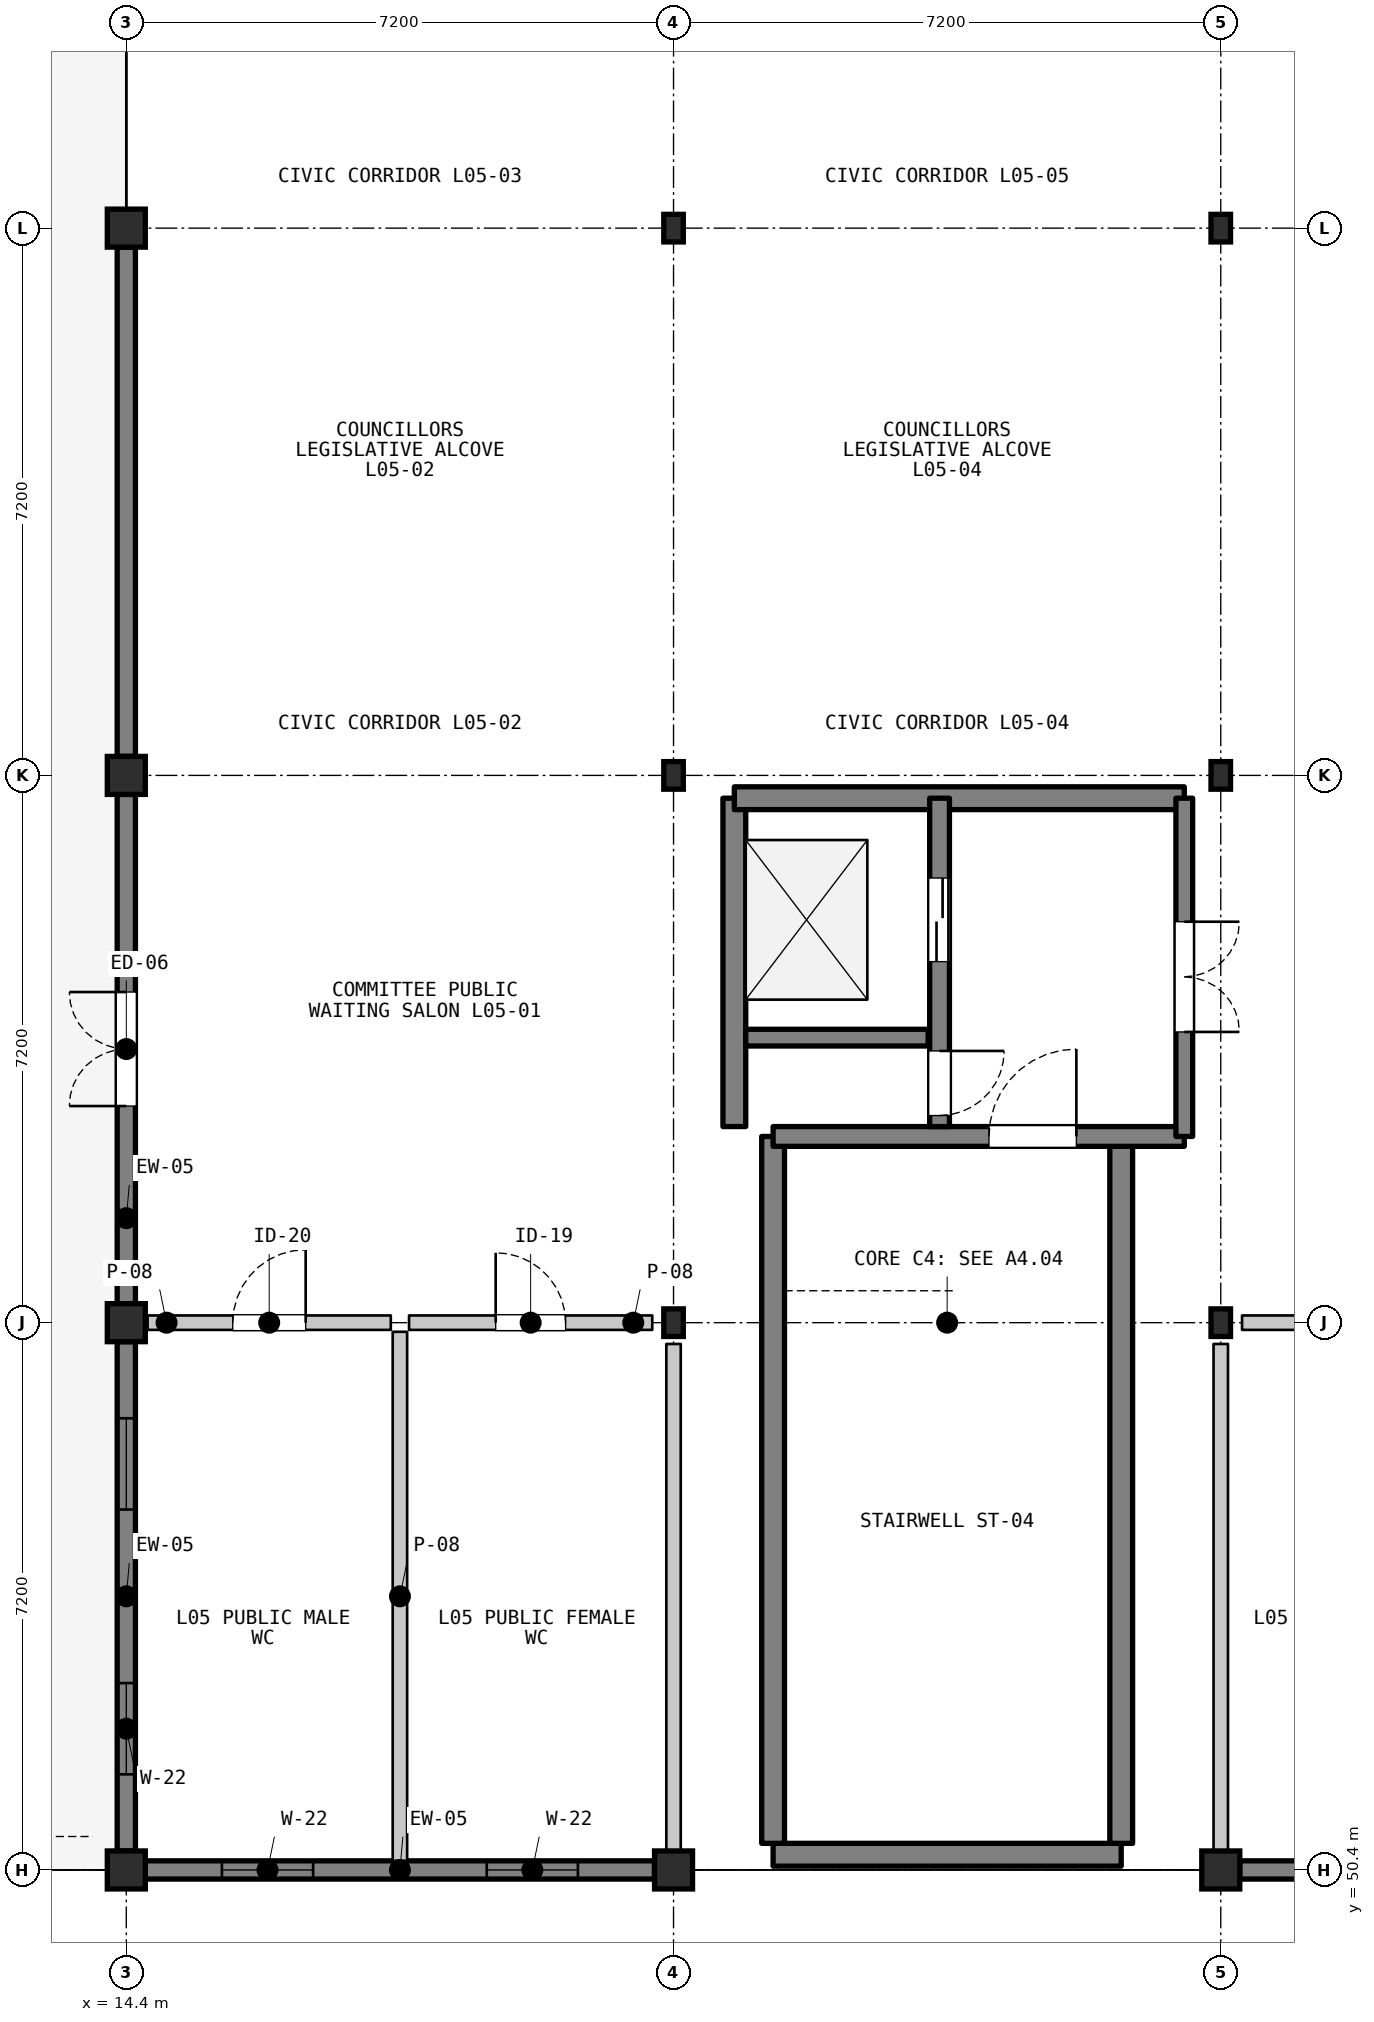
"""IFC4 building model, lengths in metres.
Left out: names, types, materials, properties, quantities, classifications, styles, units other than length and angle.
Written with IfcOpenShell. Run it as: python <this file> out.ifc"""

import sys

from ifc_helpers import new_model, si_unit, direction, frame, frame_2d, origin, origin_2d, place, context, subcontext, project, spatial, rectangle, i_section, extrude, element, fill, save


model = new_model("IFC4")
c1 = context("Model", 3, precision=1e-05, world=origin(), true_north=direction((0.0, 1.0)))
c2 = subcontext(c1, "Body", "Model", "MODEL_VIEW")
j1 = project(units=[si_unit("LENGTHUNIT", "METRE"), si_unit("PLANEANGLEUNIT", "RADIAN")], contexts=[c1])
p1 = place(None, origin())
s1 = spatial("IfcSite", under=j1, at=p1, CompositionType="ELEMENT")
p2 = place(p1, origin())
s2 = spatial("IfcBuilding", under=s1, at=p2, CompositionType="ELEMENT")
p3 = place(p2, frame((0.0, 0.0, 18.0)))
s3 = spatial("IfcBuildingStorey", under=s2, at=p3, CompositionType="ELEMENT", Elevation=18.0)
for number, where, z_axis, x_axis in (
    (1, (14.4, 50.4, 0.0), (0.0, 0.0, 1.0), (1.0, 0.0, 0.0)),
    (2, (14.4, 57.6, 0.0), (0.0, 0.0, 1.0), (1.0, 0.0, 0.0)),
    (3, (14.4, 64.8, 0.0), (0.0, 0.0, 1.0), (1.0, 0.0, 0.0)),
    (4, (14.4, 72.0, 0.0), (0.0, 0.0, 1.0), (1.0, 0.0, 0.0)),
    (5, (21.6, 50.4, 0.0), (0.0, 0.0, 1.0), (1.0, 0.0, 0.0)),
):
    element("IfcColumn", number, at=place(p3, frame(where, z_axis=z_axis, x_axis=x_axis)), inside=s3, PredefinedType="COLUMN", context=c2, shape_type="SweptSolid", body=[
        extrude(rectangle(XDim=0.5, YDim=0.5, at=origin_2d()), origin(), (0.0, 0.0, 1.0), 3.9),
    ])
for number, where, z_axis, x_axis in (
    (6, (21.6, 57.6, 0.0), (0.0, 0.0, 1.0), (1.0, 0.0, 0.0)),
    (7, (21.6, 64.8, 0.0), (0.0, 0.0, 1.0), (1.0, 0.0, 0.0)),
    (8, (21.6, 72.0, 0.0), (0.0, 0.0, 1.0), (1.0, 0.0, 0.0)),
):
    element("IfcColumn", number, at=place(p3, frame(where, z_axis=z_axis, x_axis=x_axis)), inside=s3, PredefinedType="COLUMN", context=c2, shape_type="SweptSolid", body=[
        extrude(i_section(OverallWidth=0.257, OverallDepth=0.363, WebThickness=0.013, FlangeThickness=0.022, FilletRadius=0.015, at=origin_2d()), origin(), (0.0, 0.0, 1.0), 3.9),
    ])
p4 = place(p3, frame((28.8, 50.4, 0.0), z_axis=(0.0, 0.0, 1.0), x_axis=(1.0, 0.0, 0.0)))
e9 = element("IfcColumn", 9, at=p4, inside=s3, PredefinedType="COLUMN", context=c2, shape_type="SweptSolid", body=[
    extrude(rectangle(XDim=0.5, YDim=0.5, at=origin_2d()), origin(), (0.0, 0.0, 1.0), 3.9),
])
for number, where, z_axis, x_axis in (
    (10, (28.8, 57.6, 0.0), (0.0, 0.0, 1.0), (1.0, 0.0, 0.0)),
    (11, (28.8, 64.8, 0.0), (0.0, 0.0, 1.0), (1.0, 0.0, 0.0)),
    (12, (28.8, 72.0, 0.0), (0.0, 0.0, 1.0), (1.0, 0.0, 0.0)),
):
    element("IfcColumn", number, at=place(p3, frame(where, z_axis=z_axis, x_axis=x_axis)), inside=s3, PredefinedType="COLUMN", context=c2, shape_type="SweptSolid", body=[
        extrude(i_section(OverallWidth=0.257, OverallDepth=0.363, WebThickness=0.013, FlangeThickness=0.022, FilletRadius=0.015, at=origin_2d()), origin(), (0.0, 0.0, 1.0), 3.9),
    ])
p5 = place(p3, frame((21.35, 50.4, 0.0), z_axis=(0.0, 0.0, 1.0), x_axis=(-1.0, 0.0, 0.0)))
e13 = element("IfcWall", 13, at=p5, inside=s3, PredefinedType="SOLIDWALL", context=c2, shape_type="SweptSolid", body=[
    extrude(rectangle(XDim=6.7, YDim=0.24, at=frame_2d((3.35, 0.0))), origin(), (0.0, 0.0, 1.0), 3.172),
])
p6 = place(p5, frame((1.008, 0.0, 0.95)))
e14 = element("IfcOpeningElement", 14, at=p6, cuts=e13, PredefinedType="OPENING", context=c2, shape_type="SweptSolid", body=[
    extrude(rectangle(XDim=1.2, YDim=1.7, at=frame_2d((0.6, 0.85))), frame((0.0, 0.13, 0.0), z_axis=(0.0, -1.0, 0.0), x_axis=(1.0, 0.0, 0.0)), (0.0, 0.0, 1.0), 0.26),
])
p7 = place(p5, frame((4.492, 0.0, 0.95)))
e15 = element("IfcOpeningElement", 15, at=p7, cuts=e13, PredefinedType="OPENING", context=c2, shape_type="SweptSolid", body=[
    extrude(rectangle(XDim=1.2, YDim=1.7, at=frame_2d((0.6, 0.85))), frame((0.0, 0.13, 0.0), z_axis=(0.0, -1.0, 0.0), x_axis=(1.0, 0.0, 0.0)), (0.0, 0.0, 1.0), 0.26),
])
p8 = place(p3, frame((14.4, 50.65, 0.0), z_axis=(0.0, 0.0, 1.0), x_axis=(0.0, 1.0, 0.0)))
e16 = element("IfcWall", 16, at=p8, inside=s3, PredefinedType="SOLIDWALL", context=c2, shape_type="SweptSolid", body=[
    extrude(rectangle(XDim=6.7, YDim=0.24, at=frame_2d((3.35, 0.0))), origin(), (0.0, 0.0, 1.0), 3.172),
])
p9 = place(p8, frame((1.008, 0.0, 0.95)))
e17 = element("IfcOpeningElement", 17, at=p9, cuts=e16, PredefinedType="OPENING", context=c2, shape_type="SweptSolid", body=[
    extrude(rectangle(XDim=1.2, YDim=1.7, at=frame_2d((0.6, 0.85))), frame((0.0, 0.13, 0.0), z_axis=(0.0, -1.0, 0.0), x_axis=(1.0, 0.0, 0.0)), (0.0, 0.0, 1.0), 0.26),
])
p10 = place(p8, frame((4.492, 0.0, 0.95)))
e18 = element("IfcOpeningElement", 18, at=p10, cuts=e16, PredefinedType="OPENING", context=c2, shape_type="SweptSolid", body=[
    extrude(rectangle(XDim=1.2, YDim=1.7, at=frame_2d((0.6, 0.85))), frame((0.0, 0.13, 0.0), z_axis=(0.0, -1.0, 0.0), x_axis=(1.0, 0.0, 0.0)), (0.0, 0.0, 1.0), 0.26),
])
p11 = place(p3, frame((14.4, 57.85, 0.0), z_axis=(0.0, 0.0, 1.0), x_axis=(0.0, 1.0, 0.0)))
e19 = element("IfcWall", 19, at=p11, inside=s3, PredefinedType="SOLIDWALL", context=c2, shape_type="SweptSolid", body=[
    extrude(rectangle(XDim=6.7, YDim=0.24, at=frame_2d((3.35, 0.0))), origin(), (0.0, 0.0, 1.0), 3.172),
])
p12 = place(p11, frame((2.6, 0.0, 0.0)))
e20 = element("IfcOpeningElement", 20, at=p12, cuts=e19, PredefinedType="OPENING", context=c2, shape_type="SweptSolid", body=[
    extrude(rectangle(XDim=1.5, YDim=2.25, at=frame_2d((0.75, 1.125))), frame((0.0, 0.13, 0.0), z_axis=(0.0, -1.0, 0.0), x_axis=(1.0, 0.0, 0.0)), (0.0, 0.0, 1.0), 0.26),
])
p13 = place(p3, frame((14.4, 65.05, 0.0), z_axis=(0.0, 0.0, 1.0), x_axis=(0.0, 1.0, 0.0)))
e21 = element("IfcWall", 21, at=p13, inside=s3, PredefinedType="SOLIDWALL", context=c2, shape_type="SweptSolid", body=[
    extrude(rectangle(XDim=6.7, YDim=0.24, at=frame_2d((3.35, 0.0))), origin(), (0.0, 0.0, 1.0), 3.172),
])
p14 = place(p3, frame((35.75, 50.4, 0.0), z_axis=(0.0, 0.0, 1.0), x_axis=(-1.0, 0.0, 0.0)))
e22 = element("IfcWall", 22, at=p14, inside=s3, PredefinedType="SOLIDWALL", context=c2, shape_type="SweptSolid", body=[
    extrude(rectangle(XDim=6.7, YDim=0.24, at=frame_2d((3.35, 0.0))), origin(), (0.0, 0.0, 1.0), 3.172),
])
p15 = place(p14, frame((2.225, 0.0, 0.95)))
e23 = element("IfcOpeningElement", 23, at=p15, cuts=e22, PredefinedType="OPENING", context=c2, shape_type="SweptSolid", body=[
    extrude(rectangle(XDim=2.25, YDim=1.65, at=frame_2d((1.125, 0.825))), frame((0.0, 0.13, 0.0), z_axis=(0.0, -1.0, 0.0), x_axis=(1.0, 0.0, 0.0)), (0.0, 0.0, 1.0), 0.26),
])
p16 = place(p3, frame((22.91, 50.6, 0.0), z_axis=(0.0, 0.0, 1.0), x_axis=(1.0, 0.0, 0.0)))
e24 = element("IfcWall", 24, at=p16, inside=s3, PredefinedType="SHEAR", context=c2, shape_type="SweptSolid", body=[
    extrude(rectangle(XDim=4.58, YDim=0.3, at=frame_2d((2.29, 0.0))), origin(), (0.0, 0.0, 1.0), 3.72),
])
for number, where, z_axis, x_axis in (
    (25, (22.91, 50.75, 0.0), (0.0, 0.0, 1.0), (0.0, 1.0, 0.0)),
    (26, (27.49, 50.75, 0.0), (0.0, 0.0, 1.0), (0.0, 1.0, 0.0)),
):
    element("IfcWall", number, at=place(p3, frame(where, z_axis=z_axis, x_axis=x_axis)), inside=s3, PredefinedType="SHEAR", context=c2, shape_type="SweptSolid", body=[
        extrude(rectangle(XDim=9.3, YDim=0.3, at=frame_2d((4.65, 0.0))), origin(), (0.0, 0.0, 1.0), 3.72),
    ])
p17 = place(p3, frame((22.91, 60.05, 0.0), z_axis=(0.0, 0.0, 1.0), x_axis=(1.0, 0.0, 0.0)))
e27 = element("IfcWall", 27, at=p17, inside=s3, PredefinedType="SHEAR", context=c2, shape_type="SweptSolid", body=[
    extrude(rectangle(XDim=5.41, YDim=0.26, at=frame_2d((2.705, 0.0))), origin(), (0.0, 0.0, 1.0), 3.72),
])
p18 = place(p17, frame((2.84, 0.0, 0.0)))
e28 = element("IfcOpeningElement", 28, at=p18, cuts=e27, PredefinedType="OPENING", context=c2, shape_type="SweptSolid", body=[
    extrude(rectangle(XDim=1.15, YDim=2.15, at=frame_2d((0.575, 1.075))), frame((0.0, 0.14, 0.0), z_axis=(0.0, -1.0, 0.0), x_axis=(1.0, 0.0, 0.0)), (0.0, 0.0, 1.0), 0.28),
])
p19 = place(p3, frame((22.4, 60.18, 0.0), z_axis=(0.0, 0.0, 1.0), x_axis=(0.0, 1.0, 0.0)))
e29 = element("IfcWall", 29, at=p19, inside=s3, PredefinedType="SHEAR", context=c2, shape_type="SweptSolid", body=[
    extrude(rectangle(XDim=4.32, YDim=0.3, at=frame_2d((2.16, 0.0))), origin(), (0.0, 0.0, 1.0), 3.72),
])
p20 = place(p3, frame((22.4, 64.5, 0.0), z_axis=(0.0, 0.0, 1.0), x_axis=(1.0, 0.0, 0.0)))
e30 = element("IfcWall", 30, at=p20, inside=s3, PredefinedType="SHEAR", context=c2, shape_type="SweptSolid", body=[
    extrude(rectangle(XDim=5.92, YDim=0.3, at=frame_2d((2.96, 0.0))), origin(), (0.0, 0.0, 1.0), 3.72),
])
p21 = place(p3, frame((22.55, 61.35, 0.0), z_axis=(0.0, 0.0, 1.0), x_axis=(1.0, 0.0, 0.0)))
e31 = element("IfcWall", 31, at=p21, inside=s3, PredefinedType="SHEAR", context=c2, shape_type="SweptSolid", body=[
    extrude(rectangle(XDim=2.4, YDim=0.22, at=frame_2d((1.2, 0.0))), origin(), (0.0, 0.0, 1.0), 3.72),
])
p22 = place(p3, frame((25.1, 64.5, 0.0), z_axis=(0.0, 0.0, 1.0), x_axis=(0.0, -1.0, 0.0)))
e32 = element("IfcWall", 32, at=p22, inside=s3, PredefinedType="SHEAR", context=c2, shape_type="SweptSolid", body=[
    extrude(rectangle(XDim=4.32, YDim=0.26, at=frame_2d((2.16, 0.0))), origin(), (0.0, 0.0, 1.0), 3.72),
])
p23 = place(p22, frame((1.05, 0.0, 0.0)))
e33 = element("IfcOpeningElement", 33, at=p23, cuts=e32, PredefinedType="OPENING", context=c2, shape_type="SweptSolid", body=[
    extrude(rectangle(XDim=1.1, YDim=2.15, at=frame_2d((0.55, 1.075))), frame((0.0, 0.14, 0.0), z_axis=(0.0, -1.0, 0.0), x_axis=(1.0, 0.0, 0.0)), (0.0, 0.0, 1.0), 0.28),
])
p24 = place(p22, frame((3.325, 0.0, 0.0)))
e34 = element("IfcOpeningElement", 34, at=p24, cuts=e32, PredefinedType="OPENING", context=c2, shape_type="SweptSolid", body=[
    extrude(rectangle(XDim=0.85, YDim=2.05, at=frame_2d((0.425, 1.025))), frame((0.0, 0.14, 0.0), z_axis=(0.0, -1.0, 0.0), x_axis=(1.0, 0.0, 0.0)), (0.0, 0.0, 1.0), 0.28),
])
p25 = place(p3, frame((28.32, 64.5, 0.0), z_axis=(0.0, 0.0, 1.0), x_axis=(0.0, -1.0, 0.0)))
e35 = element("IfcWall", 35, at=p25, inside=s3, PredefinedType="SHEAR", context=c2, shape_type="SweptSolid", body=[
    extrude(rectangle(XDim=4.45, YDim=0.22, at=frame_2d((2.225, 0.0))), origin(), (0.0, 0.0, 1.0), 3.72),
])
p26 = place(p25, frame((1.625, 0.0, 0.0)))
e36 = element("IfcOpeningElement", 36, at=p26, cuts=e35, PredefinedType="OPENING", context=c2, shape_type="SweptSolid", body=[
    extrude(rectangle(XDim=1.45, YDim=2.2, at=frame_2d((0.725, 1.1))), frame((0.0, 0.12, 0.0), z_axis=(0.0, -1.0, 0.0), x_axis=(1.0, 0.0, 0.0)), (0.0, 0.0, 1.0), 0.24),
])
p27 = place(p3, frame((14.68, 57.6, 0.0), z_axis=(0.0, 0.0, 1.0), x_axis=(1.0, 0.0, 0.0)))
e37 = element("IfcWall", 37, at=p27, inside=s3, PredefinedType="PARTITIONING", context=c2, shape_type="SweptSolid", body=[
    extrude(rectangle(XDim=3.2, YDim=0.19, at=frame_2d((1.6, 0.0))), origin(), (0.0, 0.0, 1.0), 3.088),
])
p28 = place(p27, frame((1.12, 0.0, 0.0)))
e38 = element("IfcOpeningElement", 38, at=p28, cuts=e37, PredefinedType="OPENING", context=c2, shape_type="SweptSolid", body=[
    extrude(rectangle(XDim=0.96, YDim=2.1, at=frame_2d((0.48, 1.05))), frame((0.0, 0.105, 0.0), z_axis=(0.0, -1.0, 0.0), x_axis=(1.0, 0.0, 0.0)), (0.0, 0.0, 1.0), 0.21),
])
p29 = place(p3, frame((18.0, 57.48, 0.0), z_axis=(0.0, 0.0, 1.0), x_axis=(0.0, -1.0, 0.0)))
e39 = element("IfcWall", 39, at=p29, inside=s3, PredefinedType="PARTITIONING", context=c2, shape_type="SweptSolid", body=[
    extrude(rectangle(XDim=6.96, YDim=0.19, at=frame_2d((3.48, 0.0))), origin(), (0.0, 0.0, 1.0), 3.088),
])
p30 = place(p3, frame((18.12, 57.6, 0.0), z_axis=(0.0, 0.0, 1.0), x_axis=(1.0, 0.0, 0.0)))
e40 = element("IfcWall", 40, at=p30, inside=s3, PredefinedType="PARTITIONING", context=c2, shape_type="SweptSolid", body=[
    extrude(rectangle(XDim=3.2, YDim=0.19, at=frame_2d((1.6, 0.0))), origin(), (0.0, 0.0, 1.0), 3.088),
])
p31 = place(p30, frame((1.14, 0.0, 0.0)))
e41 = element("IfcOpeningElement", 41, at=p31, cuts=e40, PredefinedType="OPENING", context=c2, shape_type="SweptSolid", body=[
    extrude(rectangle(XDim=0.92, YDim=2.1, at=frame_2d((0.46, 1.05))), frame((0.0, 0.105, 0.0), z_axis=(0.0, -1.0, 0.0), x_axis=(1.0, 0.0, 0.0)), (0.0, 0.0, 1.0), 0.21),
])
p32 = place(p3, frame((21.6, 57.32, 0.0), z_axis=(0.0, 0.0, 1.0), x_axis=(0.0, -1.0, 0.0)))
e42 = element("IfcWall", 42, at=p32, inside=s3, PredefinedType="PARTITIONING", context=c2, shape_type="SweptSolid", body=[
    extrude(rectangle(XDim=6.8, YDim=0.19, at=frame_2d((3.4, 0.0))), origin(), (0.0, 0.0, 1.0), 3.157),
])
p33 = place(p3, frame((29.08, 57.6, 0.0), z_axis=(0.0, 0.0, 1.0), x_axis=(1.0, 0.0, 0.0)))
e43 = element("IfcWall", 43, at=p33, inside=s3, PredefinedType="PARTITIONING", context=c2, shape_type="SweptSolid", body=[
    extrude(rectangle(XDim=2.6, YDim=0.19, at=frame_2d((1.3, 0.0))), origin(), (0.0, 0.0, 1.0), 3.088),
])
p34 = place(p33, frame((0.79, 0.0, 0.0)))
e44 = element("IfcOpeningElement", 44, at=p34, cuts=e43, PredefinedType="OPENING", context=c2, shape_type="SweptSolid", body=[
    extrude(rectangle(XDim=1.02, YDim=2.15, at=frame_2d((0.51, 1.075))), frame((0.0, 0.105, 0.0), z_axis=(0.0, -1.0, 0.0), x_axis=(1.0, 0.0, 0.0)), (0.0, 0.0, 1.0), 0.21),
])
p35 = place(p3, frame((28.8, 50.52, 0.0), z_axis=(0.0, 0.0, 1.0), x_axis=(0.0, 1.0, 0.0)))
e45 = element("IfcWall", 45, at=p35, inside=s3, PredefinedType="PARTITIONING", context=c2, shape_type="SweptSolid", body=[
    extrude(rectangle(XDim=6.8, YDim=0.19, at=frame_2d((3.4, 0.0))), origin(), (0.0, 0.0, 1.0), 3.157),
])
p36 = place(p6, origin())
e46 = element("IfcWindow", 46, at=p36, inside=s3, PartitioningType="SINGLE_PANEL", PredefinedType="WINDOW", context=c2, shape_type="SweptSolid", body=[
    extrude(rectangle(XDim=1.2, YDim=1.7, at=frame_2d((0.6, 0.85))), frame((0.0, 0.03, 0.0), z_axis=(0.0, -1.0, 0.0), x_axis=(1.0, 0.0, 0.0)), (0.0, 0.0, 1.0), 0.06),
])
fill(e14, e46)
p37 = place(p7, origin())
e47 = element("IfcWindow", 47, at=p37, inside=s3, PartitioningType="SINGLE_PANEL", PredefinedType="WINDOW", context=c2, shape_type="SweptSolid", body=[
    extrude(rectangle(XDim=1.2, YDim=1.7, at=frame_2d((0.6, 0.85))), frame((0.0, 0.03, 0.0), z_axis=(0.0, -1.0, 0.0), x_axis=(1.0, 0.0, 0.0)), (0.0, 0.0, 1.0), 0.06),
])
fill(e15, e47)
p38 = place(p9, origin())
e48 = element("IfcWindow", 48, at=p38, inside=s3, PartitioningType="SINGLE_PANEL", PredefinedType="WINDOW", context=c2, shape_type="SweptSolid", body=[
    extrude(rectangle(XDim=1.2, YDim=1.7, at=frame_2d((0.6, 0.85))), frame((0.0, 0.03, 0.0), z_axis=(0.0, -1.0, 0.0), x_axis=(1.0, 0.0, 0.0)), (0.0, 0.0, 1.0), 0.06),
])
fill(e17, e48)
p39 = place(p10, origin())
e49 = element("IfcWindow", 49, at=p39, inside=s3, PartitioningType="SINGLE_PANEL", PredefinedType="WINDOW", context=c2, shape_type="SweptSolid", body=[
    extrude(rectangle(XDim=1.2, YDim=1.7, at=frame_2d((0.6, 0.85))), frame((0.0, 0.03, 0.0), z_axis=(0.0, -1.0, 0.0), x_axis=(1.0, 0.0, 0.0)), (0.0, 0.0, 1.0), 0.06),
])
fill(e18, e49)
p40 = place(p12, origin())
e50 = element("IfcDoor", 50, at=p40, inside=s3, OperationType="DOUBLE_DOOR_SINGLE_SWING", PredefinedType="DOOR", context=c2, shape_type="SweptSolid", body=[
    extrude(rectangle(XDim=1.5, YDim=2.25, at=frame_2d((0.75, 1.125))), frame((0.0, 0.025, 0.0), z_axis=(0.0, -1.0, 0.0), x_axis=(1.0, 0.0, 0.0)), (0.0, 0.0, 1.0), 0.05),
])
fill(e20, e50)
p41 = place(p18, origin())
e51 = element("IfcDoor", 51, at=p41, inside=s3, OperationType="SINGLE_SWING_RIGHT", PredefinedType="DOOR", context=c2, shape_type="SweptSolid", body=[
    extrude(rectangle(XDim=1.15, YDim=2.15, at=frame_2d((0.575, 1.075))), frame((0.0, 0.025, 0.0), z_axis=(0.0, -1.0, 0.0), x_axis=(1.0, 0.0, 0.0)), (0.0, 0.0, 1.0), 0.05),
])
fill(e28, e51)
p42 = place(p23, origin())
e52 = element("IfcDoor", 52, at=p42, inside=s3, OperationType="DOUBLE_DOOR_SLIDING", PredefinedType="DOOR", context=c2, shape_type="SweptSolid", body=[
    extrude(rectangle(XDim=1.1, YDim=2.15, at=frame_2d((0.55, 1.075))), frame((0.0, 0.025, 0.0), z_axis=(0.0, -1.0, 0.0), x_axis=(1.0, 0.0, 0.0)), (0.0, 0.0, 1.0), 0.05),
])
fill(e33, e52)
p43 = place(p24, origin())
e53 = element("IfcDoor", 53, at=p43, inside=s3, OperationType="SINGLE_SWING_LEFT", PredefinedType="DOOR", context=c2, shape_type="SweptSolid", body=[
    extrude(rectangle(XDim=0.85, YDim=2.05, at=frame_2d((0.425, 1.025))), frame((0.0, 0.025, 0.0), z_axis=(0.0, -1.0, 0.0), x_axis=(1.0, 0.0, 0.0)), (0.0, 0.0, 1.0), 0.05),
])
fill(e34, e53)
p44 = place(p26, origin())
e54 = element("IfcDoor", 54, at=p44, inside=s3, OperationType="DOUBLE_DOOR_SINGLE_SWING", PredefinedType="DOOR", context=c2, shape_type="SweptSolid", body=[
    extrude(rectangle(XDim=1.45, YDim=2.2, at=frame_2d((0.725, 1.1))), frame((0.0, 0.025, 0.0), z_axis=(0.0, -1.0, 0.0), x_axis=(1.0, 0.0, 0.0)), (0.0, 0.0, 1.0), 0.05),
])
fill(e36, e54)
p45 = place(p28, origin())
e55 = element("IfcDoor", 55, at=p45, inside=s3, OperationType="SINGLE_SWING_RIGHT", PredefinedType="DOOR", context=c2, shape_type="SweptSolid", body=[
    extrude(rectangle(XDim=0.96, YDim=2.1, at=frame_2d((0.48, 1.05))), frame((0.0, 0.025, 0.0), z_axis=(0.0, -1.0, 0.0), x_axis=(1.0, 0.0, 0.0)), (0.0, 0.0, 1.0), 0.05),
])
fill(e38, e55)
p46 = place(p31, origin())
e56 = element("IfcDoor", 56, at=p46, inside=s3, OperationType="SINGLE_SWING_LEFT", PredefinedType="DOOR", context=c2, shape_type="SweptSolid", body=[
    extrude(rectangle(XDim=0.92, YDim=2.1, at=frame_2d((0.46, 1.05))), frame((0.0, 0.025, 0.0), z_axis=(0.0, -1.0, 0.0), x_axis=(1.0, 0.0, 0.0)), (0.0, 0.0, 1.0), 0.05),
])
fill(e41, e56)
save(model, sys.argv[1])
